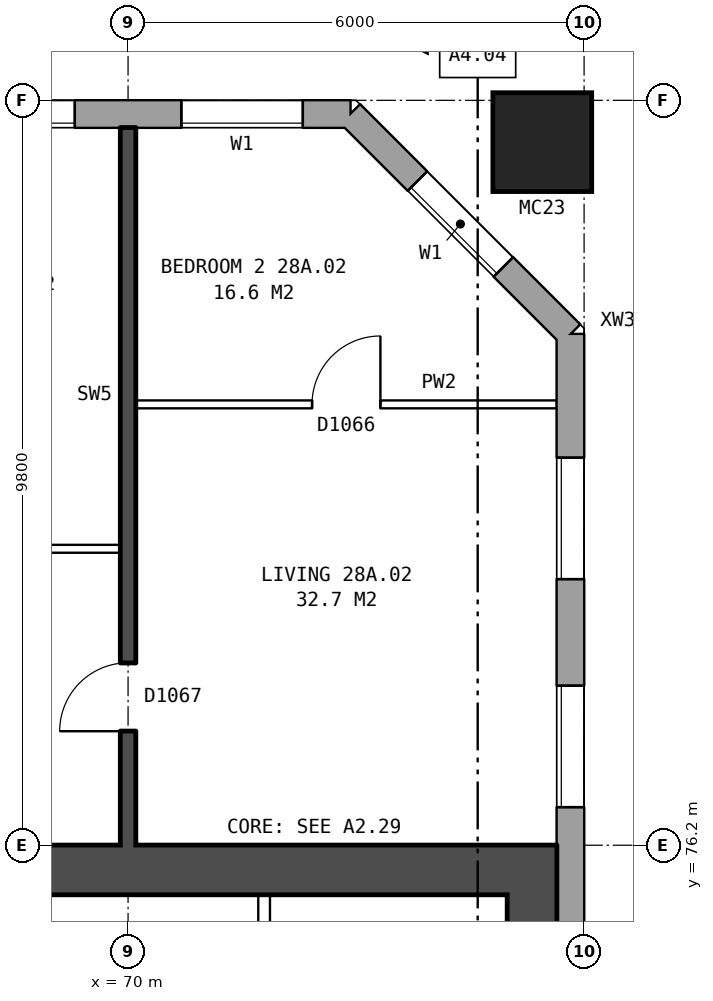
"""IFC4 building model, lengths in metres.
Left out: names, types, materials, properties, quantities, classifications, styles, units other than length and angle.
Written with IfcOpenShell. Run it as: python <this file> out.ifc"""

import sys

from ifc_helpers import new_model, si_unit, direction, frame, frame_2d, origin, origin_2d, place, context, subcontext, project, spatial, rectangle, hollow_rectangle, extrude, element, fill, save


model = new_model("IFC4")
c1 = context("Model", 3, precision=1e-05, world=origin(), true_north=direction((0.0, 1.0)))
c2 = subcontext(c1, "Body", "Model", "MODEL_VIEW")
j1 = project(units=[si_unit("LENGTHUNIT", "METRE"), si_unit("PLANEANGLEUNIT", "RADIAN")], contexts=[c1])
p1 = place(None, origin())
s1 = spatial("IfcSite", under=j1, at=p1, CompositionType="ELEMENT")
p2 = place(p1, origin())
s2 = spatial("IfcBuilding", under=s1, at=p2, CompositionType="ELEMENT")
p3 = place(p2, frame((0.0, 0.0, 102.6)))
s3 = spatial("IfcBuildingStorey", under=s2, at=p3, CompositionType="ELEMENT", Elevation=102.6)
p4 = place(p3, frame((75.45, 85.45, 0.0), z_axis=(0.0, 0.0, 1.0), x_axis=(1.0, 0.0, 0.0)))
e1 = element("IfcColumn", 1, at=p4, inside=s3, PredefinedType="COLUMN", context=c2, shape_type="SweptSolid", body=[
    extrude(hollow_rectangle(XDim=1.3, YDim=1.3, WallThickness=0.07, at=origin_2d()), origin(), (0.0, 0.0, 1.0), 3.1),
])
p5 = place(p3, frame((75.82, 57.075, 0.0), z_axis=(0.0, 0.0, 1.0), x_axis=(0.0, 1.0, 0.0)))
e2 = element("IfcWall", 2, at=p5, inside=s3, PredefinedType="STANDARD", context=c2, shape_type="SweptSolid", body=[
    extrude(rectangle(XDim=25.851, YDim=0.36, at=frame_2d((12.925, 0.0))), origin(), (0.0, 0.0, 1.0), 2.85),
])
p6 = place(p5, frame((1.625, 0.0, 0.8)))
e3 = element("IfcOpeningElement", 3, at=p6, cuts=e2, PredefinedType="OPENING", context=c2, shape_type="SweptSolid", body=[
    extrude(rectangle(XDim=1.6, YDim=1.8, at=frame_2d((0.8, 0.9))), frame((0.0, 0.19, 0.0), z_axis=(0.0, -1.0, 0.0), x_axis=(1.0, 0.0, 0.0)), (0.0, 0.0, 1.0), 0.38),
])
p7 = place(p5, frame((4.625, 0.0, 0.8)))
e4 = element("IfcOpeningElement", 4, at=p7, cuts=e2, PredefinedType="OPENING", context=c2, shape_type="SweptSolid", body=[
    extrude(rectangle(XDim=1.6, YDim=1.8, at=frame_2d((0.8, 0.9))), frame((0.0, 0.19, 0.0), z_axis=(0.0, -1.0, 0.0), x_axis=(1.0, 0.0, 0.0)), (0.0, 0.0, 1.0), 0.38),
])
p8 = place(p5, frame((19.625, 0.0, 0.8)))
e5 = element("IfcOpeningElement", 5, at=p8, cuts=e2, PredefinedType="OPENING", context=c2, shape_type="SweptSolid", body=[
    extrude(rectangle(XDim=1.6, YDim=1.8, at=frame_2d((0.8, 0.9))), frame((0.0, 0.19, 0.0), z_axis=(0.0, -1.0, 0.0), x_axis=(1.0, 0.0, 0.0)), (0.0, 0.0, 1.0), 0.38),
])
p9 = place(p5, frame((22.625, 0.0, 0.8)))
e6 = element("IfcOpeningElement", 6, at=p9, cuts=e2, PredefinedType="OPENING", context=c2, shape_type="SweptSolid", body=[
    extrude(rectangle(XDim=1.6, YDim=1.8, at=frame_2d((0.8, 0.9))), frame((0.0, 0.19, 0.0), z_axis=(0.0, -1.0, 0.0), x_axis=(1.0, 0.0, 0.0)), (0.0, 0.0, 1.0), 0.38),
])
p10 = place(p3, frame((75.82, 82.925, 0.0), z_axis=(0.0, 0.0, 1.0), x_axis=(-0.707106781187, 0.707106781187, 0.0)))
e7 = element("IfcWall", 7, at=p10, inside=s3, PredefinedType="STANDARD", context=c2, shape_type="SweptSolid", body=[
    extrude(rectangle(XDim=4.094, YDim=0.36, at=frame_2d((2.047, 0.0))), origin(), (0.0, 0.0, 1.0), 2.85),
])
p11 = place(p10, frame((1.247, 0.0, 0.8)))
e8 = element("IfcOpeningElement", 8, at=p11, cuts=e7, PredefinedType="OPENING", context=c2, shape_type="SweptSolid", body=[
    extrude(rectangle(XDim=1.6, YDim=1.8, at=frame_2d((0.8, 0.9))), frame((0.0, 0.19, 0.0), z_axis=(0.0, -1.0, 0.0), x_axis=(1.0, 0.0, 0.0)), (0.0, 0.0, 1.0), 0.38),
])
p12 = place(p3, frame((72.925, 85.82, 0.0), z_axis=(0.0, 0.0, 1.0), x_axis=(-1.0, 0.0, 0.0)))
e9 = element("IfcWall", 9, at=p12, inside=s3, PredefinedType="STANDARD", context=c2, shape_type="SweptSolid", body=[
    extrude(rectangle(XDim=44.851, YDim=0.36, at=frame_2d((22.425, 0.0))), origin(), (0.0, 0.0, 1.0), 2.85),
])
p13 = place(p12, frame((0.625, 0.0, 0.8)))
e10 = element("IfcOpeningElement", 10, at=p13, cuts=e9, PredefinedType="OPENING", context=c2, shape_type="SweptSolid", body=[
    extrude(rectangle(XDim=1.6, YDim=1.8, at=frame_2d((0.8, 0.9))), frame((0.0, 0.19, 0.0), z_axis=(0.0, -1.0, 0.0), x_axis=(1.0, 0.0, 0.0)), (0.0, 0.0, 1.0), 0.38),
])
p14 = place(p12, frame((3.625, 0.0, 0.8)))
e11 = element("IfcOpeningElement", 11, at=p14, cuts=e9, PredefinedType="OPENING", context=c2, shape_type="SweptSolid", body=[
    extrude(rectangle(XDim=1.6, YDim=1.8, at=frame_2d((0.8, 0.9))), frame((0.0, 0.19, 0.0), z_axis=(0.0, -1.0, 0.0), x_axis=(1.0, 0.0, 0.0)), (0.0, 0.0, 1.0), 0.38),
])
p15 = place(p12, frame((5.525, 0.0, 0.8)))
e12 = element("IfcOpeningElement", 12, at=p15, cuts=e9, PredefinedType="OPENING", context=c2, shape_type="SweptSolid", body=[
    extrude(rectangle(XDim=0.8, YDim=1.8, at=frame_2d((0.4, 0.9))), frame((0.0, 0.19, 0.0), z_axis=(0.0, -1.0, 0.0), x_axis=(1.0, 0.0, 0.0)), (0.0, 0.0, 1.0), 0.38),
])
p16 = place(p12, frame((9.125, 0.0, 0.8)))
e13 = element("IfcOpeningElement", 13, at=p16, cuts=e9, PredefinedType="OPENING", context=c2, shape_type="SweptSolid", body=[
    extrude(rectangle(XDim=0.6, YDim=0.9, at=frame_2d((0.3, 0.45))), frame((0.0, 0.19, 0.0), z_axis=(0.0, -1.0, 0.0), x_axis=(1.0, 0.0, 0.0)), (0.0, 0.0, 1.0), 0.38),
])
p17 = place(p12, frame((12.625, 0.0, 0.8)))
e14 = element("IfcOpeningElement", 14, at=p17, cuts=e9, PredefinedType="OPENING", context=c2, shape_type="SweptSolid", body=[
    extrude(rectangle(XDim=1.6, YDim=1.8, at=frame_2d((0.8, 0.9))), frame((0.0, 0.19, 0.0), z_axis=(0.0, -1.0, 0.0), x_axis=(1.0, 0.0, 0.0)), (0.0, 0.0, 1.0), 0.38),
])
p18 = place(p12, frame((15.625, 0.0, 0.8)))
e15 = element("IfcOpeningElement", 15, at=p18, cuts=e9, PredefinedType="OPENING", context=c2, shape_type="SweptSolid", body=[
    extrude(rectangle(XDim=1.6, YDim=1.8, at=frame_2d((0.8, 0.9))), frame((0.0, 0.19, 0.0), z_axis=(0.0, -1.0, 0.0), x_axis=(1.0, 0.0, 0.0)), (0.0, 0.0, 1.0), 0.38),
])
p19 = place(p12, frame((18.625, 0.0, 0.8)))
e16 = element("IfcOpeningElement", 16, at=p19, cuts=e9, PredefinedType="OPENING", context=c2, shape_type="SweptSolid", body=[
    extrude(rectangle(XDim=1.6, YDim=1.8, at=frame_2d((0.8, 0.9))), frame((0.0, 0.19, 0.0), z_axis=(0.0, -1.0, 0.0), x_axis=(1.0, 0.0, 0.0)), (0.0, 0.0, 1.0), 0.38),
])
p20 = place(p12, frame((21.625, 0.0, 0.8)))
e17 = element("IfcOpeningElement", 17, at=p20, cuts=e9, PredefinedType="OPENING", context=c2, shape_type="SweptSolid", body=[
    extrude(rectangle(XDim=1.6, YDim=1.8, at=frame_2d((0.8, 0.9))), frame((0.0, 0.19, 0.0), z_axis=(0.0, -1.0, 0.0), x_axis=(1.0, 0.0, 0.0)), (0.0, 0.0, 1.0), 0.38),
])
p21 = place(p12, frame((24.625, 0.0, 0.8)))
e18 = element("IfcOpeningElement", 18, at=p21, cuts=e9, PredefinedType="OPENING", context=c2, shape_type="SweptSolid", body=[
    extrude(rectangle(XDim=1.6, YDim=1.8, at=frame_2d((0.8, 0.9))), frame((0.0, 0.19, 0.0), z_axis=(0.0, -1.0, 0.0), x_axis=(1.0, 0.0, 0.0)), (0.0, 0.0, 1.0), 0.38),
])
p22 = place(p12, frame((27.625, 0.0, 0.8)))
e19 = element("IfcOpeningElement", 19, at=p22, cuts=e9, PredefinedType="OPENING", context=c2, shape_type="SweptSolid", body=[
    extrude(rectangle(XDim=1.6, YDim=1.8, at=frame_2d((0.8, 0.9))), frame((0.0, 0.19, 0.0), z_axis=(0.0, -1.0, 0.0), x_axis=(1.0, 0.0, 0.0)), (0.0, 0.0, 1.0), 0.38),
])
p23 = place(p12, frame((30.625, 0.0, 0.8)))
e20 = element("IfcOpeningElement", 20, at=p23, cuts=e9, PredefinedType="OPENING", context=c2, shape_type="SweptSolid", body=[
    extrude(rectangle(XDim=1.6, YDim=1.8, at=frame_2d((0.8, 0.9))), frame((0.0, 0.19, 0.0), z_axis=(0.0, -1.0, 0.0), x_axis=(1.0, 0.0, 0.0)), (0.0, 0.0, 1.0), 0.38),
])
p24 = place(p12, frame((33.125, 0.0, 0.8)))
e21 = element("IfcOpeningElement", 21, at=p24, cuts=e9, PredefinedType="OPENING", context=c2, shape_type="SweptSolid", body=[
    extrude(rectangle(XDim=1.4, YDim=1.8, at=frame_2d((0.7, 0.9))), frame((0.0, 0.19, 0.0), z_axis=(0.0, -1.0, 0.0), x_axis=(1.0, 0.0, 0.0)), (0.0, 0.0, 1.0), 0.38),
])
p25 = place(p12, frame((34.825, 0.0, 0.8)))
e22 = element("IfcOpeningElement", 22, at=p25, cuts=e9, PredefinedType="OPENING", context=c2, shape_type="SweptSolid", body=[
    extrude(rectangle(XDim=1.0, YDim=0.9, at=frame_2d((0.5, 0.45))), frame((0.0, 0.19, 0.0), z_axis=(0.0, -1.0, 0.0), x_axis=(1.0, 0.0, 0.0)), (0.0, 0.0, 1.0), 0.38),
])
p26 = place(p12, frame((39.625, 0.0, 0.8)))
e23 = element("IfcOpeningElement", 23, at=p26, cuts=e9, PredefinedType="OPENING", context=c2, shape_type="SweptSolid", body=[
    extrude(rectangle(XDim=1.6, YDim=1.8, at=frame_2d((0.8, 0.9))), frame((0.0, 0.19, 0.0), z_axis=(0.0, -1.0, 0.0), x_axis=(1.0, 0.0, 0.0)), (0.0, 0.0, 1.0), 0.38),
])
p27 = place(p12, frame((42.625, 0.0, 0.8)))
e24 = element("IfcOpeningElement", 24, at=p27, cuts=e9, PredefinedType="OPENING", context=c2, shape_type="SweptSolid", body=[
    extrude(rectangle(XDim=1.6, YDim=1.8, at=frame_2d((0.8, 0.9))), frame((0.0, 0.19, 0.0), z_axis=(0.0, -1.0, 0.0), x_axis=(1.0, 0.0, 0.0)), (0.0, 0.0, 1.0), 0.38),
])
p28 = place(p12, frame((6.625, 0.0, 1.7)))
e25 = element("IfcOpeningElement", 25, at=p28, cuts=e9, PredefinedType="OPENING", context=c2, shape_type="SweptSolid", body=[
    extrude(rectangle(XDim=1.0, YDim=0.9, at=frame_2d((0.5, 0.45))), frame((0.0, 0.19, 0.0), z_axis=(0.0, -1.0, 0.0), x_axis=(1.0, 0.0, 0.0)), (0.0, 0.0, 1.0), 0.38),
])
p29 = place(p12, frame((10.175, 0.0, 0.8)))
e26 = element("IfcOpeningElement", 26, at=p29, cuts=e9, PredefinedType="OPENING", context=c2, shape_type="SweptSolid", body=[
    extrude(rectangle(XDim=1.6, YDim=1.8, at=frame_2d((0.8, 0.9))), frame((0.0, 0.19, 0.0), z_axis=(0.0, -1.0, 0.0), x_axis=(1.0, 0.0, 0.0)), (0.0, 0.0, 1.0), 0.38),
])
p30 = place(p12, frame((37.175, 0.0, 1.7)))
e27 = element("IfcOpeningElement", 27, at=p30, cuts=e9, PredefinedType="OPENING", context=c2, shape_type="SweptSolid", body=[
    extrude(rectangle(XDim=0.6, YDim=0.9, at=frame_2d((0.3, 0.45))), frame((0.0, 0.19, 0.0), z_axis=(0.0, -1.0, 0.0), x_axis=(1.0, 0.0, 0.0)), (0.0, 0.0, 1.0), 0.38),
])
p31 = place(p12, frame((38.075, 0.0, 1.1)))
e28 = element("IfcOpeningElement", 28, at=p31, cuts=e9, PredefinedType="OPENING", context=c2, shape_type="SweptSolid", body=[
    extrude(rectangle(XDim=0.6, YDim=1.5, at=frame_2d((0.3, 0.75))), frame((0.0, 0.19, 0.0), z_axis=(0.0, -1.0, 0.0), x_axis=(1.0, 0.0, 0.0)), (0.0, 0.0, 1.0), 0.38),
])
p32 = place(p3, frame((75.315, 64.45, 0.0), z_axis=(0.0, 0.0, 1.0), x_axis=(0.0, 1.0, 0.0)))
e29 = element("IfcWall", 29, at=p32, inside=s3, PredefinedType="SHEAR", context=c2, shape_type="SweptSolid", body=[
    extrude(rectangle(XDim=11.1, YDim=0.65, at=frame_2d((5.55, 0.0))), origin(), (0.0, 0.0, 1.0), 2.85),
])
p33 = place(p3, frame((66.64, 75.875, 0.0), z_axis=(0.0, 0.0, 1.0), x_axis=(1.0, 0.0, 0.0)))
e30 = element("IfcWall", 30, at=p33, inside=s3, PredefinedType="SHEAR", context=c2, shape_type="SweptSolid", body=[
    extrude(rectangle(XDim=9.0, YDim=0.65, at=frame_2d((4.5, 0.0))), origin(), (0.0, 0.0, 1.0), 2.85),
])
p34 = place(p3, frame((71.79, 73.45, 0.0), z_axis=(0.0, 0.0, 1.0), x_axis=(0.0, 1.0, 0.0)))
e31 = element("IfcWall", 31, at=p34, inside=s3, PredefinedType="PARTITIONING", context=c2, shape_type="SweptSolid", body=[
    extrude(rectangle(XDim=2.1, YDim=0.15, at=frame_2d((1.05, 0.0))), origin(), (0.0, 0.0, 1.0), 2.85),
])
p35 = place(p34, frame((0.625, 0.0, 0.0)))
e32 = element("IfcOpeningElement", 32, at=p35, cuts=e31, PredefinedType="OPENING", context=c2, shape_type="SweptSolid", body=[
    extrude(rectangle(XDim=0.85, YDim=2.1, at=frame_2d((0.425, 1.05))), frame((0.0, 0.085, 0.0), z_axis=(0.0, -1.0, 0.0), x_axis=(1.0, 0.0, 0.0)), (0.0, 0.0, 1.0), 0.17),
])
p36 = place(p3, frame((64.1, 80.1, 0.0), z_axis=(0.0, 0.0, 1.0), x_axis=(1.0, 0.0, 0.0)))
e33 = element("IfcWall", 33, at=p36, inside=s3, PredefinedType="PARTITIONING", context=c2, shape_type="SweptSolid", body=[
    extrude(rectangle(XDim=5.8, YDim=0.1, at=frame_2d((2.9, 0.0))), origin(), (0.0, 0.0, 1.0), 2.85),
])
p37 = place(p36, frame((3.6, 0.0, 0.0)))
e34 = element("IfcOpeningElement", 34, at=p37, cuts=e33, PredefinedType="OPENING", context=c2, shape_type="SweptSolid", body=[
    extrude(rectangle(XDim=0.9, YDim=2.1, at=frame_2d((0.45, 1.05))), frame((0.0, 0.06, 0.0), z_axis=(0.0, -1.0, 0.0), x_axis=(1.0, 0.0, 0.0)), (0.0, 0.0, 1.0), 0.12),
])
p38 = place(p36, frame((0.7, 0.0, 0.0)))
e35 = element("IfcOpeningElement", 35, at=p38, cuts=e33, PredefinedType="OPENING", context=c2, shape_type="SweptSolid", body=[
    extrude(rectangle(XDim=0.9, YDim=2.1, at=frame_2d((0.45, 1.05))), frame((0.0, 0.06, 0.0), z_axis=(0.0, -1.0, 0.0), x_axis=(1.0, 0.0, 0.0)), (0.0, 0.0, 1.0), 0.12),
])
p39 = place(p3, frame((70.1, 82.0, 0.0), z_axis=(0.0, 0.0, 1.0), x_axis=(1.0, 0.0, 0.0)))
e36 = element("IfcWall", 36, at=p39, inside=s3, PredefinedType="PARTITIONING", context=c2, shape_type="SweptSolid", body=[
    extrude(rectangle(XDim=5.54, YDim=0.1, at=frame_2d((2.77, 0.0))), origin(), (0.0, 0.0, 1.0), 2.85),
])
p40 = place(p39, frame((2.32, 0.0, 0.0)))
e37 = element("IfcOpeningElement", 37, at=p40, cuts=e36, PredefinedType="OPENING", context=c2, shape_type="SweptSolid", body=[
    extrude(rectangle(XDim=0.9, YDim=2.1, at=frame_2d((0.45, 1.05))), frame((0.0, 0.06, 0.0), z_axis=(0.0, -1.0, 0.0), x_axis=(1.0, 0.0, 0.0)), (0.0, 0.0, 1.0), 0.12),
])
p41 = place(p3, frame((70.0, 76.2, 0.0), z_axis=(0.0, 0.0, 1.0), x_axis=(0.0, 1.0, 0.0)))
e38 = element("IfcWall", 38, at=p41, inside=s3, PredefinedType="SOLIDWALL", context=c2, shape_type="SweptSolid", body=[
    extrude(rectangle(XDim=9.44, YDim=0.2, at=frame_2d((4.72, 0.0))), origin(), (0.0, 0.0, 1.0), 2.85),
])
p42 = place(p41, frame((1.5, 0.0, 0.0)))
e39 = element("IfcOpeningElement", 39, at=p42, cuts=e38, PredefinedType="OPENING", context=c2, shape_type="SweptSolid", body=[
    extrude(rectangle(XDim=0.9, YDim=2.1, at=frame_2d((0.45, 1.05))), frame((0.0, 0.11, 0.0), z_axis=(0.0, -1.0, 0.0), x_axis=(1.0, 0.0, 0.0)), (0.0, 0.0, 1.0), 0.22),
])
p43 = place(p8, origin())
e40 = element("IfcWindow", 40, at=p43, inside=s3, PartitioningType="SINGLE_PANEL", PredefinedType="WINDOW", context=c2, shape_type="SweptSolid", body=[
    extrude(rectangle(XDim=1.6, YDim=1.8, at=frame_2d((0.8, 0.9))), frame((0.0, 0.15, 0.0), z_axis=(0.0, -1.0, 0.0), x_axis=(1.0, 0.0, 0.0)), (0.0, 0.0, 1.0), 0.06),
])
fill(e5, e40)
p44 = place(p9, origin())
e41 = element("IfcWindow", 41, at=p44, inside=s3, PartitioningType="SINGLE_PANEL", PredefinedType="WINDOW", context=c2, shape_type="SweptSolid", body=[
    extrude(rectangle(XDim=1.6, YDim=1.8, at=frame_2d((0.8, 0.9))), frame((0.0, 0.15, 0.0), z_axis=(0.0, -1.0, 0.0), x_axis=(1.0, 0.0, 0.0)), (0.0, 0.0, 1.0), 0.06),
])
fill(e6, e41)
p45 = place(p11, origin())
e42 = element("IfcWindow", 42, at=p45, inside=s3, PartitioningType="SINGLE_PANEL", PredefinedType="WINDOW", context=c2, shape_type="SweptSolid", body=[
    extrude(rectangle(XDim=1.6, YDim=1.8, at=frame_2d((0.8, 0.9))), frame((0.0, 0.15, 0.0), z_axis=(0.0, -1.0, 0.0), x_axis=(1.0, 0.0, 0.0)), (0.0, 0.0, 1.0), 0.06),
])
fill(e8, e42)
p46 = place(p13, origin())
e43 = element("IfcWindow", 43, at=p46, inside=s3, PartitioningType="SINGLE_PANEL", PredefinedType="WINDOW", context=c2, shape_type="SweptSolid", body=[
    extrude(rectangle(XDim=1.6, YDim=1.8, at=frame_2d((0.8, 0.9))), frame((0.0, 0.15, 0.0), z_axis=(0.0, -1.0, 0.0), x_axis=(1.0, 0.0, 0.0)), (0.0, 0.0, 1.0), 0.06),
])
fill(e10, e43)
p47 = place(p14, origin())
e44 = element("IfcWindow", 44, at=p47, inside=s3, PartitioningType="SINGLE_PANEL", PredefinedType="WINDOW", context=c2, shape_type="SweptSolid", body=[
    extrude(rectangle(XDim=1.6, YDim=1.8, at=frame_2d((0.8, 0.9))), frame((0.0, 0.15, 0.0), z_axis=(0.0, -1.0, 0.0), x_axis=(1.0, 0.0, 0.0)), (0.0, 0.0, 1.0), 0.06),
])
fill(e11, e44)
p48 = place(p40, origin())
e45 = element("IfcDoor", 45, at=p48, inside=s3, OperationType="SINGLE_SWING_RIGHT", PredefinedType="DOOR", context=c2, shape_type="SweptSolid", body=[
    extrude(rectangle(XDim=0.9, YDim=2.1, at=frame_2d((0.45, 1.05))), frame((0.0, 0.025, 0.0), z_axis=(0.0, -1.0, 0.0), x_axis=(1.0, 0.0, 0.0)), (0.0, 0.0, 1.0), 0.05),
])
fill(e37, e45)
p49 = place(p42, origin())
e46 = element("IfcDoor", 46, at=p49, inside=s3, OperationType="SINGLE_SWING_LEFT", PredefinedType="DOOR", context=c2, shape_type="SweptSolid", body=[
    extrude(rectangle(XDim=0.9, YDim=2.1, at=frame_2d((0.45, 1.05))), frame((0.0, 0.025, 0.0), z_axis=(0.0, -1.0, 0.0), x_axis=(1.0, 0.0, 0.0)), (0.0, 0.0, 1.0), 0.05),
])
fill(e39, e46)
save(model, sys.argv[1])
